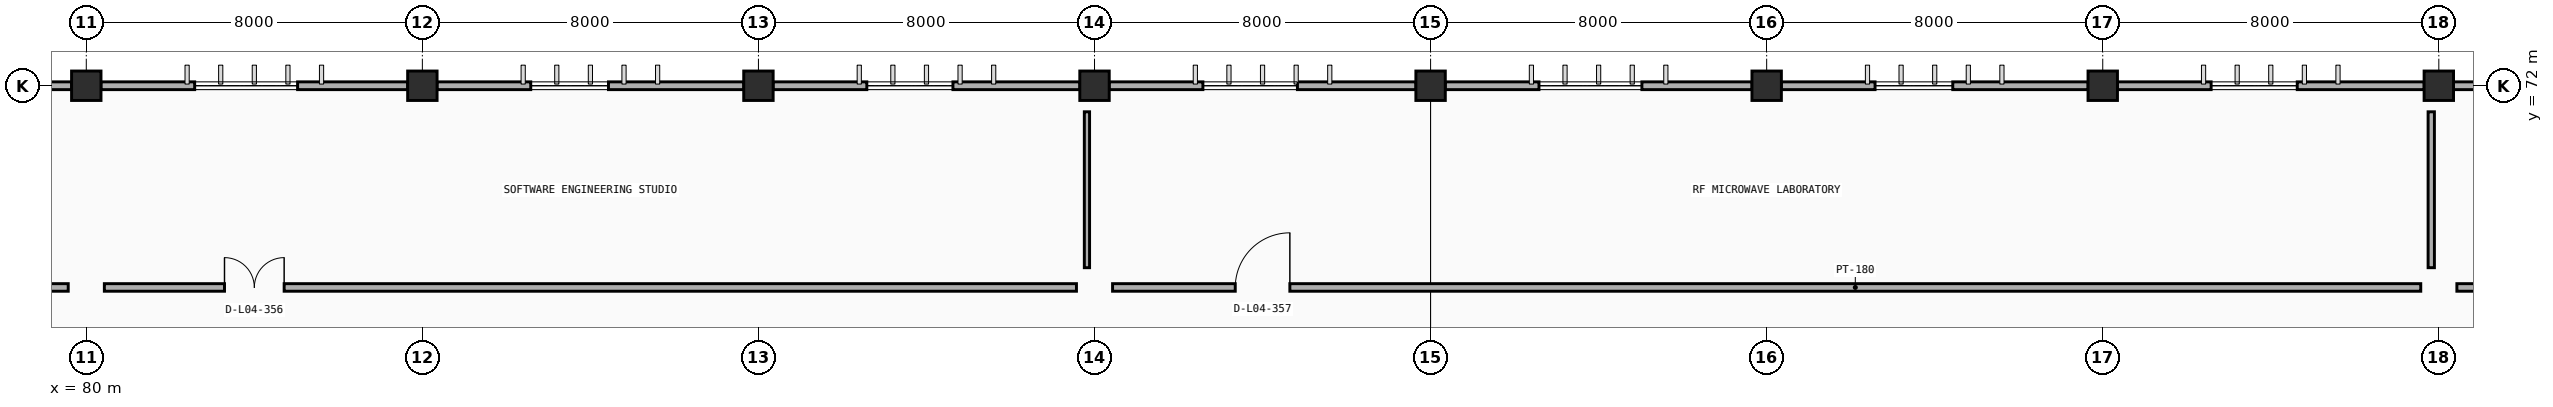
"""IFC4 building model, lengths in metres.
Left out: names, types, materials, properties, quantities, classifications, styles, units other than length and angle.
Written with IfcOpenShell. Run it as: python <this file> out.ifc"""

import sys

from ifc_helpers import new_model, si_unit, direction, frame, frame_2d, origin, origin_2d, place, context, subcontext, project, spatial, rectangle, extrude, element, fill, save


model = new_model("IFC4")
c1 = context("Model", 3, precision=1e-05, world=origin(), true_north=direction((0.0, 1.0)))
c2 = subcontext(c1, "Body", "Model", "MODEL_VIEW")
j1 = project(units=[si_unit("LENGTHUNIT", "METRE"), si_unit("PLANEANGLEUNIT", "RADIAN")], contexts=[c1])
p1 = place(None, origin())
s1 = spatial("IfcSite", under=j1, at=p1, CompositionType="ELEMENT")
p2 = place(p1, origin())
s2 = spatial("IfcBuilding", under=s1, at=p2, CompositionType="ELEMENT")
p3 = place(p2, frame((0.0, 0.0, 13.8)))
s3 = spatial("IfcBuildingStorey", under=s2, at=p3, CompositionType="ELEMENT", Elevation=13.8)
for number, where, z_axis, x_axis in (
    (1, (80.0, 72.0, 0.0), (0.0, 0.0, 1.0), (1.0, 0.0, 0.0)),
    (2, (88.0, 72.0, 0.0), (0.0, 0.0, 1.0), (1.0, 0.0, 0.0)),
    (3, (96.0, 72.0, 0.0), (0.0, 0.0, 1.0), (1.0, 0.0, 0.0)),
    (4, (104.0, 72.0, 0.0), (0.0, 0.0, 1.0), (1.0, 0.0, 0.0)),
    (5, (112.0, 72.0, 0.0), (0.0, 0.0, 1.0), (1.0, 0.0, 0.0)),
    (6, (120.0, 72.0, 0.0), (0.0, 0.0, 1.0), (1.0, 0.0, 0.0)),
    (7, (128.0, 72.0, 0.0), (0.0, 0.0, 1.0), (1.0, 0.0, 0.0)),
    (8, (136.0, 72.0, 0.0), (0.0, 0.0, 1.0), (1.0, 0.0, 0.0)),
):
    element("IfcColumn", number, at=place(p3, frame(where, z_axis=z_axis, x_axis=x_axis)), inside=s3, PredefinedType="COLUMN", context=c2, shape_type="SweptSolid", body=[
        extrude(rectangle(XDim=0.7, YDim=0.7, at=origin_2d()), origin(), (0.0, 0.0, 1.0), 4.2),
    ])
p4 = place(p3, frame((72.347, 72.0, 0.0), z_axis=(0.0, 0.0, 1.0), x_axis=(1.0, 0.0, 0.0)))
e9 = element("IfcWall", 9, at=p4, inside=s3, PredefinedType="STANDARD", context=c2, shape_type="SweptSolid", body=[
    extrude(rectangle(XDim=7.306, YDim=0.185, at=frame_2d((3.653, 0.0))), origin(), (0.0, 0.0, 1.0), 3.325),
])
p5 = place(p4, frame((2.233, 0.0, 0.9)))
e10 = element("IfcOpeningElement", 10, at=p5, cuts=e9, PredefinedType="OPENING", context=c2, shape_type="SweptSolid", body=[
    extrude(rectangle(XDim=2.25, YDim=2.0, at=frame_2d((1.125, 1.0))), frame((0.0, 0.103, 0.0), z_axis=(0.0, -1.0, 0.0), x_axis=(1.0, 0.0, 0.0)), (0.0, 0.0, 1.0), 0.205),
])
p6 = place(p3, frame((80.347, 72.0, 0.0), z_axis=(0.0, 0.0, 1.0), x_axis=(1.0, 0.0, 0.0)))
e11 = element("IfcWall", 11, at=p6, inside=s3, PredefinedType="STANDARD", context=c2, shape_type="SweptSolid", body=[
    extrude(rectangle(XDim=7.306, YDim=0.185, at=frame_2d((3.653, 0.0))), origin(), (0.0, 0.0, 1.0), 3.325),
])
p7 = place(p6, frame((2.233, 0.0, 0.9)))
e12 = element("IfcOpeningElement", 12, at=p7, cuts=e11, PredefinedType="OPENING", context=c2, shape_type="SweptSolid", body=[
    extrude(rectangle(XDim=2.45, YDim=2.0, at=frame_2d((1.225, 1.0))), frame((0.0, 0.103, 0.0), z_axis=(0.0, -1.0, 0.0), x_axis=(1.0, 0.0, 0.0)), (0.0, 0.0, 1.0), 0.205),
])
p8 = place(p3, frame((88.347, 72.0, 0.0), z_axis=(0.0, 0.0, 1.0), x_axis=(1.0, 0.0, 0.0)))
e13 = element("IfcWall", 13, at=p8, inside=s3, PredefinedType="STANDARD", context=c2, shape_type="SweptSolid", body=[
    extrude(rectangle(XDim=7.306, YDim=0.185, at=frame_2d((3.653, 0.0))), origin(), (0.0, 0.0, 1.0), 3.325),
])
p9 = place(p8, frame((2.233, 0.0, 0.9)))
e14 = element("IfcOpeningElement", 14, at=p9, cuts=e13, PredefinedType="OPENING", context=c2, shape_type="SweptSolid", body=[
    extrude(rectangle(XDim=1.85, YDim=2.0, at=frame_2d((0.925, 1.0))), frame((0.0, 0.103, 0.0), z_axis=(0.0, -1.0, 0.0), x_axis=(1.0, 0.0, 0.0)), (0.0, 0.0, 1.0), 0.205),
])
p10 = place(p3, frame((96.347, 72.0, 0.0), z_axis=(0.0, 0.0, 1.0), x_axis=(1.0, 0.0, 0.0)))
e15 = element("IfcWall", 15, at=p10, inside=s3, PredefinedType="STANDARD", context=c2, shape_type="SweptSolid", body=[
    extrude(rectangle(XDim=7.306, YDim=0.185, at=frame_2d((3.653, 0.0))), origin(), (0.0, 0.0, 1.0), 3.325),
])
p11 = place(p10, frame((2.233, 0.0, 0.9)))
e16 = element("IfcOpeningElement", 16, at=p11, cuts=e15, PredefinedType="OPENING", context=c2, shape_type="SweptSolid", body=[
    extrude(rectangle(XDim=2.05, YDim=2.0, at=frame_2d((1.025, 1.0))), frame((0.0, 0.103, 0.0), z_axis=(0.0, -1.0, 0.0), x_axis=(1.0, 0.0, 0.0)), (0.0, 0.0, 1.0), 0.205),
])
p12 = place(p3, frame((104.347, 72.0, 0.0), z_axis=(0.0, 0.0, 1.0), x_axis=(1.0, 0.0, 0.0)))
e17 = element("IfcWall", 17, at=p12, inside=s3, PredefinedType="STANDARD", context=c2, shape_type="SweptSolid", body=[
    extrude(rectangle(XDim=7.306, YDim=0.185, at=frame_2d((3.653, 0.0))), origin(), (0.0, 0.0, 1.0), 3.325),
])
p13 = place(p12, frame((2.233, 0.0, 0.9)))
e18 = element("IfcOpeningElement", 18, at=p13, cuts=e17, PredefinedType="OPENING", context=c2, shape_type="SweptSolid", body=[
    extrude(rectangle(XDim=2.25, YDim=2.0, at=frame_2d((1.125, 1.0))), frame((0.0, 0.103, 0.0), z_axis=(0.0, -1.0, 0.0), x_axis=(1.0, 0.0, 0.0)), (0.0, 0.0, 1.0), 0.205),
])
p14 = place(p3, frame((112.347, 72.0, 0.0), z_axis=(0.0, 0.0, 1.0), x_axis=(1.0, 0.0, 0.0)))
e19 = element("IfcWall", 19, at=p14, inside=s3, PredefinedType="STANDARD", context=c2, shape_type="SweptSolid", body=[
    extrude(rectangle(XDim=7.306, YDim=0.185, at=frame_2d((3.653, 0.0))), origin(), (0.0, 0.0, 1.0), 3.325),
])
p15 = place(p14, frame((2.233, 0.0, 0.9)))
e20 = element("IfcOpeningElement", 20, at=p15, cuts=e19, PredefinedType="OPENING", context=c2, shape_type="SweptSolid", body=[
    extrude(rectangle(XDim=2.45, YDim=2.0, at=frame_2d((1.225, 1.0))), frame((0.0, 0.103, 0.0), z_axis=(0.0, -1.0, 0.0), x_axis=(1.0, 0.0, 0.0)), (0.0, 0.0, 1.0), 0.205),
])
p16 = place(p3, frame((120.347, 72.0, 0.0), z_axis=(0.0, 0.0, 1.0), x_axis=(1.0, 0.0, 0.0)))
e21 = element("IfcWall", 21, at=p16, inside=s3, PredefinedType="STANDARD", context=c2, shape_type="SweptSolid", body=[
    extrude(rectangle(XDim=7.306, YDim=0.185, at=frame_2d((3.653, 0.0))), origin(), (0.0, 0.0, 1.0), 3.325),
])
p17 = place(p16, frame((2.233, 0.0, 0.9)))
e22 = element("IfcOpeningElement", 22, at=p17, cuts=e21, PredefinedType="OPENING", context=c2, shape_type="SweptSolid", body=[
    extrude(rectangle(XDim=1.85, YDim=2.0, at=frame_2d((0.925, 1.0))), frame((0.0, 0.103, 0.0), z_axis=(0.0, -1.0, 0.0), x_axis=(1.0, 0.0, 0.0)), (0.0, 0.0, 1.0), 0.205),
])
p18 = place(p3, frame((128.347, 72.0, 0.0), z_axis=(0.0, 0.0, 1.0), x_axis=(1.0, 0.0, 0.0)))
e23 = element("IfcWall", 23, at=p18, inside=s3, PredefinedType="STANDARD", context=c2, shape_type="SweptSolid", body=[
    extrude(rectangle(XDim=7.306, YDim=0.185, at=frame_2d((3.653, 0.0))), origin(), (0.0, 0.0, 1.0), 3.325),
])
p19 = place(p18, frame((2.233, 0.0, 0.9)))
e24 = element("IfcOpeningElement", 24, at=p19, cuts=e23, PredefinedType="OPENING", context=c2, shape_type="SweptSolid", body=[
    extrude(rectangle(XDim=2.05, YDim=2.0, at=frame_2d((1.025, 1.0))), frame((0.0, 0.103, 0.0), z_axis=(0.0, -1.0, 0.0), x_axis=(1.0, 0.0, 0.0)), (0.0, 0.0, 1.0), 0.205),
])
p20 = place(p3, frame((136.347, 72.0, 0.0), z_axis=(0.0, 0.0, 1.0), x_axis=(1.0, 0.0, 0.0)))
e25 = element("IfcWall", 25, at=p20, inside=s3, PredefinedType="STANDARD", context=c2, shape_type="SweptSolid", body=[
    extrude(rectangle(XDim=7.306, YDim=0.185, at=frame_2d((3.653, 0.0))), origin(), (0.0, 0.0, 1.0), 3.325),
])
p21 = place(p20, frame((2.233, 0.0, 0.9)))
e26 = element("IfcOpeningElement", 26, at=p21, cuts=e25, PredefinedType="OPENING", context=c2, shape_type="SweptSolid", body=[
    extrude(rectangle(XDim=2.25, YDim=2.0, at=frame_2d((1.125, 1.0))), frame((0.0, 0.103, 0.0), z_axis=(0.0, -1.0, 0.0), x_axis=(1.0, 0.0, 0.0)), (0.0, 0.0, 1.0), 0.205),
])
p22 = place(p3, frame((56.43, 67.2, 0.0), z_axis=(0.0, 0.0, 1.0), x_axis=(1.0, 0.0, 0.0)))
e27 = element("IfcWall", 27, at=p22, inside=s3, PredefinedType="PARTITIONING", context=c2, shape_type="SweptSolid", body=[
    extrude(rectangle(XDim=23.14, YDim=0.18, at=frame_2d((11.57, 0.0))), origin(), (0.0, 0.0, 1.0), 3.3),
])
p23 = place(p22, frame((3.045, 0.0, 0.0)))
e28 = element("IfcOpeningElement", 28, at=p23, cuts=e27, PredefinedType="OPENING", context=c2, shape_type="SweptSolid", body=[
    extrude(rectangle(XDim=1.05, YDim=2.15, at=frame_2d((0.525, 1.075))), frame((0.0, 0.1, 0.0), z_axis=(0.0, -1.0, 0.0), x_axis=(1.0, 0.0, 0.0)), (0.0, 0.0, 1.0), 0.2),
])
p24 = place(p3, frame((80.43, 67.2, 0.0), z_axis=(0.0, 0.0, 1.0), x_axis=(1.0, 0.0, 0.0)))
e29 = element("IfcWall", 29, at=p24, inside=s3, PredefinedType="PARTITIONING", context=c2, shape_type="SweptSolid", body=[
    extrude(rectangle(XDim=23.14, YDim=0.18, at=frame_2d((11.57, 0.0))), origin(), (0.0, 0.0, 1.0), 3.3),
])
p25 = place(p24, frame((2.86, 0.0, 0.0)))
e30 = element("IfcOpeningElement", 30, at=p25, cuts=e29, PredefinedType="OPENING", context=c2, shape_type="SweptSolid", body=[
    extrude(rectangle(XDim=1.42, YDim=2.2, at=frame_2d((0.71, 1.1))), frame((0.0, 0.1, 0.0), z_axis=(0.0, -1.0, 0.0), x_axis=(1.0, 0.0, 0.0)), (0.0, 0.0, 1.0), 0.2),
])
p26 = place(p3, frame((103.82, 67.67, 0.0), z_axis=(0.0, 0.0, 1.0), x_axis=(0.0, 1.0, 0.0)))
e31 = element("IfcWall", 31, at=p26, inside=s3, PredefinedType="PARTITIONING", context=c2, shape_type="SweptSolid", body=[
    extrude(rectangle(XDim=3.71, YDim=0.125, at=frame_2d((1.855, 0.0))), origin(), (0.0, 0.0, 1.0), 3.225),
])
p27 = place(p3, frame((104.43, 67.2, 0.0), z_axis=(0.0, 0.0, 1.0), x_axis=(1.0, 0.0, 0.0)))
e32 = element("IfcWall", 32, at=p27, inside=s3, PredefinedType="PARTITIONING", context=c2, shape_type="SweptSolid", body=[
    extrude(rectangle(XDim=31.14, YDim=0.18, at=frame_2d((15.57, 0.0))), origin(), (0.0, 0.0, 1.0), 3.3),
])
p28 = place(p27, frame((2.92, 0.0, 0.0)))
e33 = element("IfcOpeningElement", 33, at=p28, cuts=e32, PredefinedType="OPENING", context=c2, shape_type="SweptSolid", body=[
    extrude(rectangle(XDim=1.3, YDim=2.18, at=frame_2d((0.65, 1.09))), frame((0.0, 0.1, 0.0), z_axis=(0.0, -1.0, 0.0), x_axis=(1.0, 0.0, 0.0)), (0.0, 0.0, 1.0), 0.2),
])
p29 = place(p3, frame((135.82, 67.67, 0.0), z_axis=(0.0, 0.0, 1.0), x_axis=(0.0, 1.0, 0.0)))
e34 = element("IfcWall", 34, at=p29, inside=s3, PredefinedType="PARTITIONING", context=c2, shape_type="SweptSolid", body=[
    extrude(rectangle(XDim=3.71, YDim=0.15, at=frame_2d((1.855, 0.0))), origin(), (0.0, 0.0, 1.0), 3.225),
])
p30 = place(p3, frame((136.43, 67.2, 0.0), z_axis=(0.0, 0.0, 1.0), x_axis=(1.0, 0.0, 0.0)))
e35 = element("IfcWall", 35, at=p30, inside=s3, PredefinedType="PARTITIONING", context=c2, shape_type="SweptSolid", body=[
    extrude(rectangle(XDim=15.14, YDim=0.18, at=frame_2d((7.57, 0.0))), origin(), (0.0, 0.0, 1.0), 3.3),
])
p31 = place(p30, frame((2.73, 0.0, 0.0)))
e36 = element("IfcOpeningElement", 36, at=p31, cuts=e35, PredefinedType="OPENING", context=c2, shape_type="SweptSolid", body=[
    extrude(rectangle(XDim=1.68, YDim=2.25, at=frame_2d((0.84, 1.125))), frame((0.0, 0.1, 0.0), z_axis=(0.0, -1.0, 0.0), x_axis=(1.0, 0.0, 0.0)), (0.0, 0.0, 1.0), 0.2),
])
p32 = place(p7, origin())
e37 = element("IfcWindow", 37, at=p32, inside=s3, PartitioningType="DOUBLE_PANEL_VERTICAL", PredefinedType="WINDOW", context=c2, shape_type="SweptSolid", body=[
    extrude(rectangle(XDim=2.45, YDim=2.0, at=frame_2d((1.225, 1.0))), frame((0.0, 0.03, 0.0), z_axis=(0.0, -1.0, 0.0), x_axis=(1.0, 0.0, 0.0)), (0.0, 0.0, 1.0), 0.06),
])
fill(e12, e37)
p33 = place(p9, origin())
e38 = element("IfcWindow", 38, at=p33, inside=s3, PartitioningType="DOUBLE_PANEL_VERTICAL", PredefinedType="WINDOW", context=c2, shape_type="SweptSolid", body=[
    extrude(rectangle(XDim=1.85, YDim=2.0, at=frame_2d((0.925, 1.0))), frame((0.0, 0.03, 0.0), z_axis=(0.0, -1.0, 0.0), x_axis=(1.0, 0.0, 0.0)), (0.0, 0.0, 1.0), 0.06),
])
fill(e14, e38)
p34 = place(p11, origin())
e39 = element("IfcWindow", 39, at=p34, inside=s3, PartitioningType="DOUBLE_PANEL_VERTICAL", PredefinedType="WINDOW", context=c2, shape_type="SweptSolid", body=[
    extrude(rectangle(XDim=2.05, YDim=2.0, at=frame_2d((1.025, 1.0))), frame((0.0, 0.03, 0.0), z_axis=(0.0, -1.0, 0.0), x_axis=(1.0, 0.0, 0.0)), (0.0, 0.0, 1.0), 0.06),
])
fill(e16, e39)
p35 = place(p13, origin())
e40 = element("IfcWindow", 40, at=p35, inside=s3, PartitioningType="DOUBLE_PANEL_VERTICAL", PredefinedType="WINDOW", context=c2, shape_type="SweptSolid", body=[
    extrude(rectangle(XDim=2.25, YDim=2.0, at=frame_2d((1.125, 1.0))), frame((0.0, 0.03, 0.0), z_axis=(0.0, -1.0, 0.0), x_axis=(1.0, 0.0, 0.0)), (0.0, 0.0, 1.0), 0.06),
])
fill(e18, e40)
p36 = place(p15, origin())
e41 = element("IfcWindow", 41, at=p36, inside=s3, PartitioningType="DOUBLE_PANEL_VERTICAL", PredefinedType="WINDOW", context=c2, shape_type="SweptSolid", body=[
    extrude(rectangle(XDim=2.45, YDim=2.0, at=frame_2d((1.225, 1.0))), frame((0.0, 0.03, 0.0), z_axis=(0.0, -1.0, 0.0), x_axis=(1.0, 0.0, 0.0)), (0.0, 0.0, 1.0), 0.06),
])
fill(e20, e41)
p37 = place(p17, origin())
e42 = element("IfcWindow", 42, at=p37, inside=s3, PartitioningType="DOUBLE_PANEL_VERTICAL", PredefinedType="WINDOW", context=c2, shape_type="SweptSolid", body=[
    extrude(rectangle(XDim=1.85, YDim=2.0, at=frame_2d((0.925, 1.0))), frame((0.0, 0.03, 0.0), z_axis=(0.0, -1.0, 0.0), x_axis=(1.0, 0.0, 0.0)), (0.0, 0.0, 1.0), 0.06),
])
fill(e22, e42)
p38 = place(p19, origin())
e43 = element("IfcWindow", 43, at=p38, inside=s3, PartitioningType="DOUBLE_PANEL_VERTICAL", PredefinedType="WINDOW", context=c2, shape_type="SweptSolid", body=[
    extrude(rectangle(XDim=2.05, YDim=2.0, at=frame_2d((1.025, 1.0))), frame((0.0, 0.03, 0.0), z_axis=(0.0, -1.0, 0.0), x_axis=(1.0, 0.0, 0.0)), (0.0, 0.0, 1.0), 0.06),
])
fill(e24, e43)
p39 = place(p25, origin())
e44 = element("IfcDoor", 44, at=p39, inside=s3, OperationType="DOUBLE_DOOR_SINGLE_SWING", PredefinedType="DOOR", context=c2, shape_type="SweptSolid", body=[
    extrude(rectangle(XDim=1.42, YDim=2.2, at=frame_2d((0.71, 1.1))), frame((0.0, 0.025, 0.0), z_axis=(0.0, -1.0, 0.0), x_axis=(1.0, 0.0, 0.0)), (0.0, 0.0, 1.0), 0.05),
])
fill(e30, e44)
p40 = place(p28, origin())
e45 = element("IfcDoor", 45, at=p40, inside=s3, OperationType="SINGLE_SWING_RIGHT", PredefinedType="DOOR", context=c2, shape_type="SweptSolid", body=[
    extrude(rectangle(XDim=1.3, YDim=2.18, at=frame_2d((0.65, 1.09))), frame((0.0, 0.025, 0.0), z_axis=(0.0, -1.0, 0.0), x_axis=(1.0, 0.0, 0.0)), (0.0, 0.0, 1.0), 0.05),
])
fill(e33, e45)
save(model, sys.argv[1])
